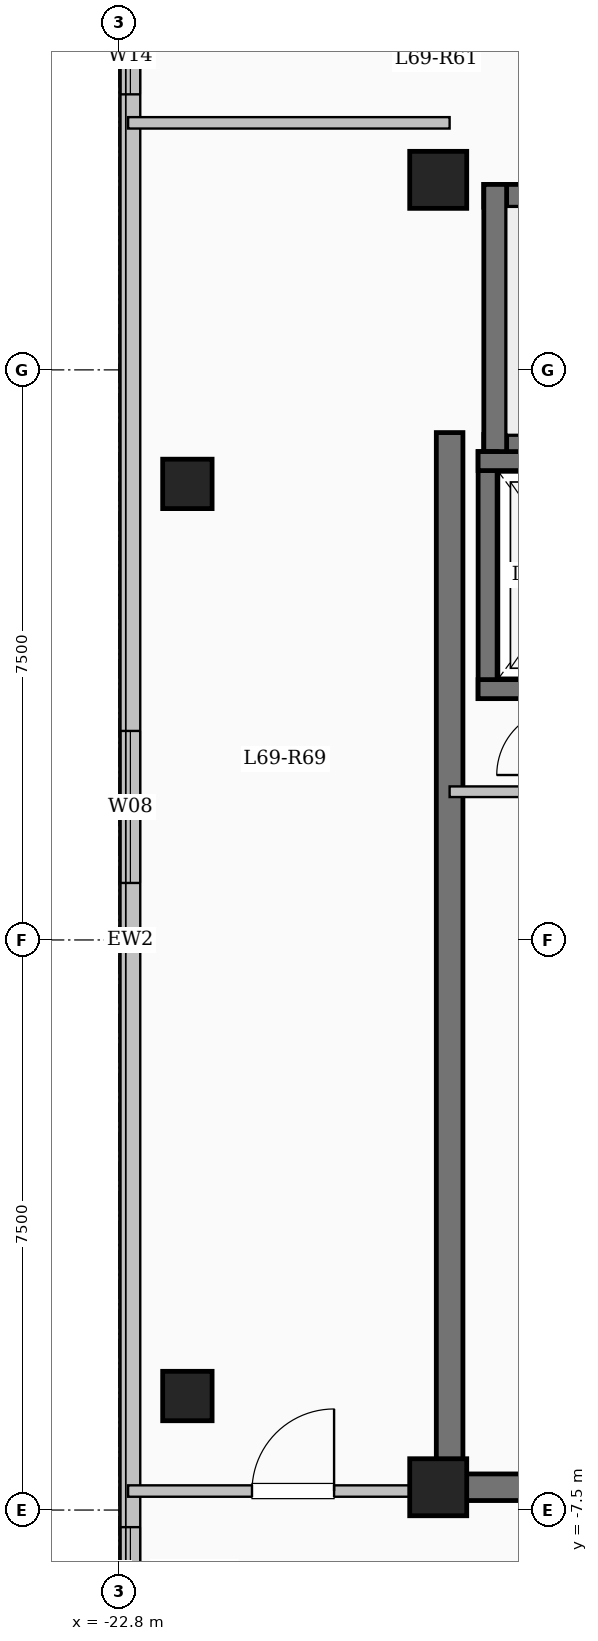
"""IFC4 building model, lengths in metres.
Left out: names, types, materials, properties, quantities, classifications, styles, units other than length and angle.
Written with IfcOpenShell. Run it as: python <this file> out.ifc"""

import sys

from ifc_helpers import new_model, si_unit, direction, frame, frame_2d, origin, origin_2d, place, context, subcontext, project, spatial, rectangle, extrude, element, fill, save


model = new_model("IFC4")
c1 = context("Model", 3, precision=1e-05, world=origin(), true_north=direction((0.0, 1.0)))
c2 = subcontext(c1, "Body", "Model", "MODEL_VIEW")
j1 = project(units=[si_unit("LENGTHUNIT", "METRE"), si_unit("PLANEANGLEUNIT", "RADIAN")], contexts=[c1])
p1 = place(None, origin())
s1 = spatial("IfcSite", under=j1, at=p1, CompositionType="ELEMENT")
p2 = place(p1, origin())
s2 = spatial("IfcBuilding", under=s1, at=p2, CompositionType="ELEMENT")
p3 = place(p2, frame((0.0, 0.0, 254.9)))
s3 = spatial("IfcBuildingStorey", under=s2, at=p3, CompositionType="ELEMENT", Elevation=254.9)
for number, where, z_axis, x_axis in (
    (1, (-18.6, -7.2, 0.0), (0.0, 0.0, 1.0), (1.0, 0.0, 0.0)),
    (2, (-18.6, 10.0, 0.0), (0.0, 0.0, 1.0), (1.0, 0.0, 0.0)),
):
    element("IfcColumn", number, at=place(p3, frame(where, z_axis=z_axis, x_axis=x_axis)), inside=s3, PredefinedType="COLUMN", context=c2, shape_type="SweptSolid", body=[
        extrude(rectangle(XDim=0.75, YDim=0.75, at=origin_2d()), origin(), (0.0, 0.0, 1.0), 3.35),
    ])
for number, where, z_axis, x_axis in (
    (3, (-21.9, -6.0, 0.0), (0.0, 0.0, 1.0), (1.0, 0.0, 0.0)),
    (4, (-21.9, 6.0, 0.0), (0.0, 0.0, 1.0), (1.0, 0.0, 0.0)),
):
    element("IfcColumn", number, at=place(p3, frame(where, z_axis=z_axis, x_axis=x_axis)), inside=s3, PredefinedType="COLUMN", context=c2, shape_type="SweptSolid", body=[
        extrude(rectangle(XDim=0.65, YDim=0.65, at=origin_2d()), origin(), (0.0, 0.0, 1.0), 3.35),
    ])
p4 = place(p3, frame((-22.65, -17.55, 0.0), z_axis=(0.0, 0.0, 1.0), x_axis=(0.0, 1.0, 0.0)))
e5 = element("IfcWall", 5, at=p4, inside=s3, PredefinedType="SOLIDWALL", context=c2, shape_type="SweptSolid", body=[
    extrude(rectangle(XDim=35.1, YDim=0.26, at=frame_2d((17.55, 0.0))), origin(), (0.0, 0.0, 1.0), 3.1),
])
p5 = place(p4, frame((2.975, 0.0, 0.9)))
e6 = element("IfcOpeningElement", 6, at=p5, cuts=e5, PredefinedType="OPENING", context=c2, shape_type="SweptSolid", body=[
    extrude(rectangle(XDim=2.2, YDim=1.75, at=frame_2d((1.1, 0.875))), frame((0.0, 0.14, 0.0), z_axis=(0.0, -1.0, 0.0), x_axis=(1.0, 0.0, 0.0)), (0.0, 0.0, 1.0), 0.28),
])
p6 = place(p4, frame((8.625, 0.0, 0.95)))
e7 = element("IfcOpeningElement", 7, at=p6, cuts=e5, PredefinedType="OPENING", context=c2, shape_type="SweptSolid", body=[
    extrude(rectangle(XDim=1.2, YDim=1.5, at=frame_2d((0.6, 0.75))), frame((0.0, 0.14, 0.0), z_axis=(0.0, -1.0, 0.0), x_axis=(1.0, 0.0, 0.0)), (0.0, 0.0, 1.0), 0.28),
])
p7 = place(p4, frame((18.3, 0.0, 0.9)))
e8 = element("IfcOpeningElement", 8, at=p7, cuts=e5, PredefinedType="OPENING", context=c2, shape_type="SweptSolid", body=[
    extrude(rectangle(XDim=2.0, YDim=1.7, at=frame_2d((1.0, 0.85))), frame((0.0, 0.14, 0.0), z_axis=(0.0, -1.0, 0.0), x_axis=(1.0, 0.0, 0.0)), (0.0, 0.0, 1.0), 0.28),
])
p8 = place(p4, frame((28.675, 0.0, 0.95)))
e9 = element("IfcOpeningElement", 9, at=p8, cuts=e5, PredefinedType="OPENING", context=c2, shape_type="SweptSolid", body=[
    extrude(rectangle(XDim=1.0, YDim=1.5, at=frame_2d((0.5, 0.75))), frame((0.0, 0.14, 0.0), z_axis=(0.0, -1.0, 0.0), x_axis=(1.0, 0.0, 0.0)), (0.0, 0.0, 1.0), 0.28),
])
p9 = place(p4, frame((31.6, 0.0, 0.9)))
e10 = element("IfcOpeningElement", 10, at=p9, cuts=e5, PredefinedType="OPENING", context=c2, shape_type="SweptSolid", body=[
    extrude(rectangle(XDim=2.0, YDim=1.7, at=frame_2d((1.0, 0.85))), frame((0.0, 0.14, 0.0), z_axis=(0.0, -1.0, 0.0), x_axis=(1.0, 0.0, 0.0)), (0.0, 0.0, 1.0), 0.28),
])
p10 = place(p3, frame((-18.0, 9.79, 0.0), z_axis=(0.0, 0.0, 1.0), x_axis=(1.0, 0.0, 0.0)))
e11 = element("IfcWall", 11, at=p10, inside=s3, PredefinedType="SHEAR", context=c2, shape_type="SweptSolid", body=[
    extrude(rectangle(XDim=8.0, YDim=0.3, at=frame_2d((4.0, 0.0))), origin(), (0.0, 0.0, 1.0), 3.35),
])
p11 = place(p3, frame((-18.0, 6.5, 0.0), z_axis=(0.0, 0.0, 1.0), x_axis=(1.0, 0.0, 0.0)))
e12 = element("IfcWall", 12, at=p11, inside=s3, PredefinedType="SHEAR", context=c2, shape_type="SweptSolid", body=[
    extrude(rectangle(XDim=8.0, YDim=0.3, at=frame_2d((4.0, 0.0))), origin(), (0.0, 0.0, 1.0), 3.35),
])
p12 = place(p11, frame((6.45, 0.0, 0.0)))
e13 = element("IfcOpeningElement", 13, at=p12, cuts=e12, PredefinedType="OPENING", context=c2, shape_type="SweptSolid", body=[
    extrude(rectangle(XDim=1.0, YDim=2.15, at=frame_2d((0.5, 1.075))), frame((0.0, 0.16, 0.0), z_axis=(0.0, -1.0, 0.0), x_axis=(1.0, 0.0, 0.0)), (0.0, 0.0, 1.0), 0.32),
])
p13 = place(p3, frame((-17.85, 6.35, 0.0), z_axis=(0.0, 0.0, 1.0), x_axis=(0.0, 1.0, 0.0)))
e14 = element("IfcWall", 14, at=p13, inside=s3, PredefinedType="SHEAR", context=c2, shape_type="SweptSolid", body=[
    extrude(rectangle(XDim=3.59, YDim=0.3, at=frame_2d((1.795, 0.0))), origin(), (0.0, 0.0, 1.0), 3.35),
])
p14 = place(p3, frame((-17.95, 3.175, 0.0), z_axis=(0.0, 0.0, 1.0), x_axis=(0.0, 1.0, 0.0)))
e15 = element("IfcWall", 15, at=p14, inside=s3, PredefinedType="SHEAR", context=c2, shape_type="SweptSolid", body=[
    extrude(rectangle(XDim=3.25, YDim=0.25, at=frame_2d((1.625, 0.0))), origin(), (0.0, 0.0, 1.0), 3.35),
])
for number, where, z_axis, x_axis in (
    (16, (-18.075, 3.3, 0.0), (0.0, 0.0, 1.0), (1.0, 0.0, 0.0)),
    (17, (-18.075, 6.3, 0.0), (0.0, 0.0, 1.0), (1.0, 0.0, 0.0)),
):
    element("IfcWall", number, at=place(p3, frame(where, z_axis=z_axis, x_axis=x_axis)), inside=s3, PredefinedType="SHEAR", context=c2, shape_type="SweptSolid", body=[
        extrude(rectangle(XDim=2.55, YDim=0.25, at=frame_2d((1.275, 0.0))), origin(), (0.0, 0.0, 1.0), 3.35),
    ])
p15 = place(p3, frame((-18.45, -7.375, 0.0), z_axis=(0.0, 0.0, 1.0), x_axis=(0.0, 1.0, 0.0)))
e18 = element("IfcWall", 18, at=p15, inside=s3, PredefinedType="SHEAR", context=c2, shape_type="SweptSolid", body=[
    extrude(rectangle(XDim=14.05, YDim=0.35, at=frame_2d((7.025, 0.0))), origin(), (0.0, 0.0, 1.0), 3.35),
])
p16 = place(p3, frame((-18.625, -7.2, 0.0), z_axis=(0.0, 0.0, 1.0), x_axis=(1.0, 0.0, 0.0)))
e19 = element("IfcWall", 19, at=p16, inside=s3, PredefinedType="SHEAR", context=c2, shape_type="SweptSolid", body=[
    extrude(rectangle(XDim=8.55, YDim=0.35, at=frame_2d((4.275, 0.0))), origin(), (0.0, 0.0, 1.0), 3.35),
])
p17 = place(p16, frame((1.725, 0.0, 0.0)))
e20 = element("IfcOpeningElement", 20, at=p17, cuts=e19, PredefinedType="OPENING", context=c2, shape_type="SweptSolid", body=[
    extrude(rectangle(XDim=1.12, YDim=2.15, at=frame_2d((0.56, 1.075))), frame((0.0, 0.185, 0.0), z_axis=(0.0, -1.0, 0.0), x_axis=(1.0, 0.0, 0.0)), (0.0, 0.0, 1.0), 0.37),
])
p18 = place(p3, frame((-18.45, 1.95, 0.0), z_axis=(0.0, 0.0, 1.0), x_axis=(1.0, 0.0, 0.0)))
e21 = element("IfcWall", 21, at=p18, inside=s3, PredefinedType="PARTITIONING", context=c2, shape_type="SweptSolid", body=[
    extrude(rectangle(XDim=3.15, YDim=0.14, at=frame_2d((1.575, 0.0))), origin(), (0.0, 0.0, 1.0), 3.1),
])
p19 = place(p18, frame((1.9, 0.0, 0.0)))
e22 = element("IfcOpeningElement", 22, at=p19, cuts=e21, PredefinedType="OPENING", context=c2, shape_type="SweptSolid", body=[
    extrude(rectangle(XDim=0.88, YDim=2.1, at=frame_2d((0.44, 1.05))), frame((0.0, 0.08, 0.0), z_axis=(0.0, -1.0, 0.0), x_axis=(1.0, 0.0, 0.0)), (0.0, 0.0, 1.0), 0.16),
])
p20 = place(p3, frame((-22.68, -7.25, 0.0), z_axis=(0.0, 0.0, 1.0), x_axis=(1.0, 0.0, 0.0)))
e23 = element("IfcWall", 23, at=p20, inside=s3, PredefinedType="PARTITIONING", context=c2, shape_type="SweptSolid", body=[
    extrude(rectangle(XDim=4.23, YDim=0.15, at=frame_2d((2.115, 0.0))), origin(), (0.0, 0.0, 1.0), 3.1),
])
p21 = place(p20, frame((1.63, 0.0, 0.0)))
e24 = element("IfcOpeningElement", 24, at=p21, cuts=e23, PredefinedType="OPENING", context=c2, shape_type="SweptSolid", body=[
    extrude(rectangle(XDim=1.08, YDim=2.15, at=frame_2d((0.54, 1.075))), frame((0.0, 0.085, 0.0), z_axis=(0.0, -1.0, 0.0), x_axis=(1.0, 0.0, 0.0)), (0.0, 0.0, 1.0), 0.17),
])
p22 = place(p3, frame((-22.68, 10.75, 0.0), z_axis=(0.0, 0.0, 1.0), x_axis=(1.0, 0.0, 0.0)))
e25 = element("IfcWall", 25, at=p22, inside=s3, PredefinedType="PARTITIONING", context=c2, shape_type="SweptSolid", body=[
    extrude(rectangle(XDim=4.23, YDim=0.15, at=frame_2d((2.115, 0.0))), origin(), (0.0, 0.0, 1.0), 3.1),
])
p23 = place(p6, origin())
e26 = element("IfcWindow", 26, at=p23, inside=s3, PartitioningType="SINGLE_PANEL", PredefinedType="WINDOW", context=c2, shape_type="SweptSolid", body=[
    extrude(rectangle(XDim=1.2, YDim=1.5, at=frame_2d((0.6, 0.75))), frame((0.0, 0.03, 0.0), z_axis=(0.0, -1.0, 0.0), x_axis=(1.0, 0.0, 0.0)), (0.0, 0.0, 1.0), 0.06),
])
fill(e7, e26)
p24 = place(p7, origin())
e27 = element("IfcWindow", 27, at=p24, inside=s3, PartitioningType="SINGLE_PANEL", PredefinedType="WINDOW", context=c2, shape_type="SweptSolid", body=[
    extrude(rectangle(XDim=2.0, YDim=1.7, at=frame_2d((1.0, 0.85))), frame((0.0, 0.03, 0.0), z_axis=(0.0, -1.0, 0.0), x_axis=(1.0, 0.0, 0.0)), (0.0, 0.0, 1.0), 0.06),
])
fill(e8, e27)
p25 = place(p8, origin())
e28 = element("IfcWindow", 28, at=p25, inside=s3, PartitioningType="SINGLE_PANEL", PredefinedType="WINDOW", context=c2, shape_type="SweptSolid", body=[
    extrude(rectangle(XDim=1.0, YDim=1.5, at=frame_2d((0.5, 0.75))), frame((0.0, 0.03, 0.0), z_axis=(0.0, -1.0, 0.0), x_axis=(1.0, 0.0, 0.0)), (0.0, 0.0, 1.0), 0.06),
])
fill(e9, e28)
p26 = place(p21, origin())
e29 = element("IfcDoor", 29, at=p26, inside=s3, OperationType="SINGLE_SWING_RIGHT", PredefinedType="DOOR", context=c2, shape_type="SweptSolid", body=[
    extrude(rectangle(XDim=1.08, YDim=2.15, at=frame_2d((0.54, 1.075))), frame((0.0, 0.025, 0.0), z_axis=(0.0, -1.0, 0.0), x_axis=(1.0, 0.0, 0.0)), (0.0, 0.0, 1.0), 0.05),
])
fill(e24, e29)
save(model, sys.argv[1])
